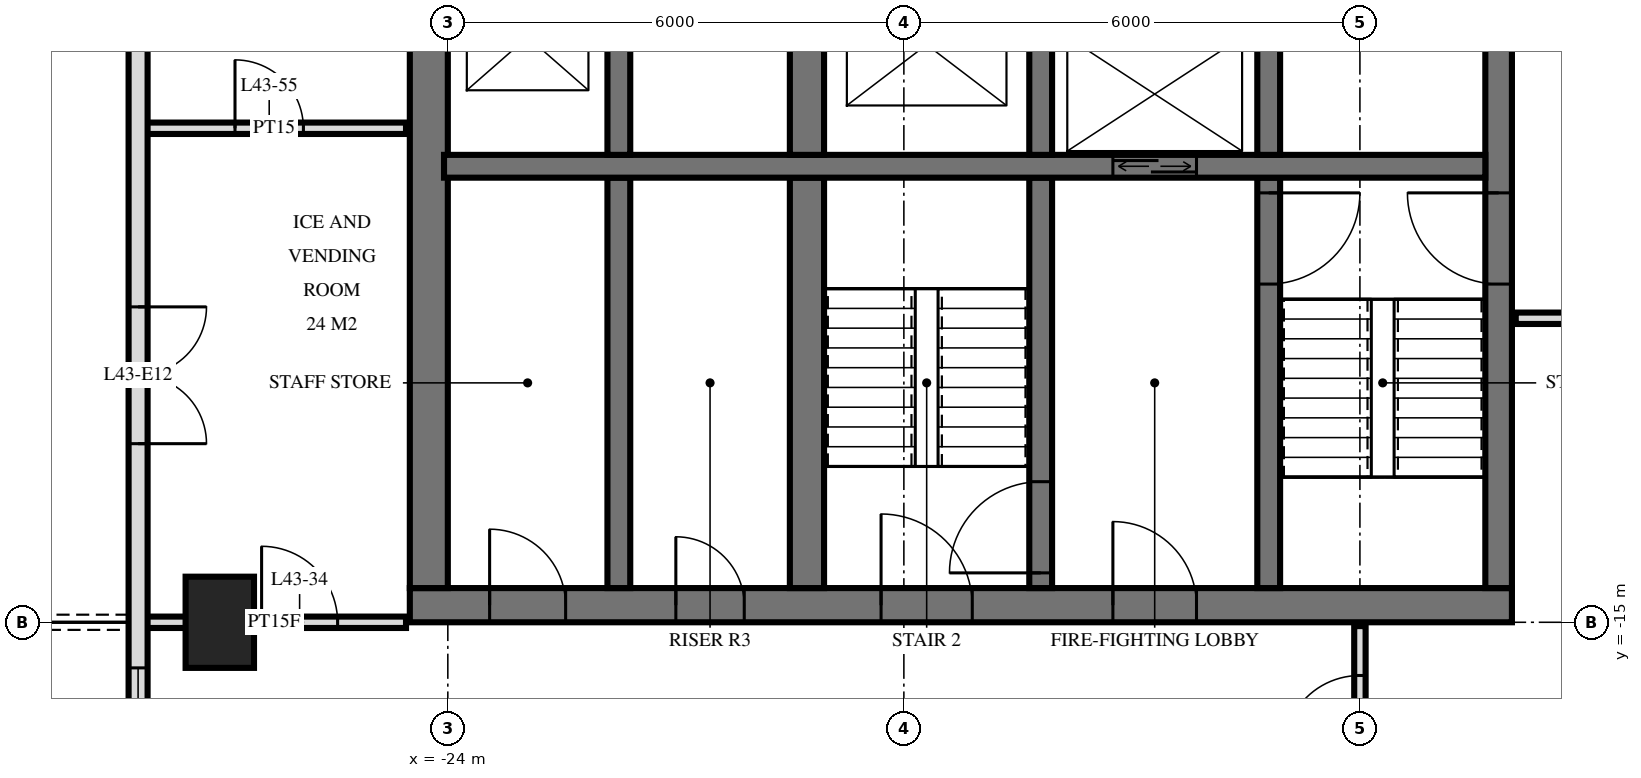
"""IFC4 building model, lengths in metres.
Left out: names, types, materials, properties, quantities, classifications, styles, units other than length and angle.
Written with IfcOpenShell. Run it as: python <this file> out.ifc"""

import sys

from ifc_helpers import new_model, si_unit, direction, frame, frame_2d, origin, origin_2d, place, context, subcontext, project, spatial, rectangle, extrude, element, fill, save


model = new_model("IFC4")
c1 = context("Model", 3, precision=1e-05, world=origin(), true_north=direction((0.0, 1.0)))
c2 = subcontext(c1, "Body", "Model", "MODEL_VIEW")
j1 = project(units=[si_unit("LENGTHUNIT", "METRE"), si_unit("PLANEANGLEUNIT", "RADIAN")], contexts=[c1])
p1 = place(None, origin())
s1 = spatial("IfcSite", under=j1, at=p1, CompositionType="ELEMENT")
p2 = place(p1, origin())
s2 = spatial("IfcBuilding", under=s1, at=p2, CompositionType="ELEMENT")
p3 = place(p2, frame((0.0, 0.0, 166.8)))
s3 = spatial("IfcBuildingStorey", under=s2, at=p3, CompositionType="ELEMENT", Elevation=166.8)
p4 = place(p3, frame((-27.0, -15.0, 0.0), z_axis=(0.0, 0.0, 1.0), x_axis=(0.0, 1.0, 0.0)))
e1 = element("IfcColumn", 1, at=p4, inside=s3, PredefinedType="COLUMN", context=c2, shape_type="SweptSolid", body=[
    extrude(rectangle(XDim=1.2, YDim=0.9, at=origin_2d()), origin(), (0.0, 0.0, 1.0), 3.6),
])
p5 = place(p3, frame((-24.5, -14.775, 0.0), z_axis=(0.0, 0.0, 1.0), x_axis=(1.0, 0.0, 0.0)))
e2 = element("IfcWall", 2, at=p5, inside=s3, PredefinedType="SHEAR", context=c2, shape_type="SweptSolid", body=[
    extrude(rectangle(XDim=14.5, YDim=0.45, at=frame_2d((7.25, 0.0))), origin(), (0.0, 0.0, 1.0), 3.6),
])
p6 = place(p5, frame((6.2, 0.0, 0.0)))
e3 = element("IfcOpeningElement", 3, at=p6, cuts=e2, PredefinedType="OPENING", context=c2, shape_type="SweptSolid", body=[
    extrude(rectangle(XDim=1.2, YDim=2.1, at=frame_2d((0.6, 1.05))), frame((0.0, 0.235, 0.0), z_axis=(0.0, -1.0, 0.0), x_axis=(1.0, 0.0, 0.0)), (0.0, 0.0, 1.0), 0.47),
])
p7 = place(p5, frame((9.25, 0.0, 0.0)))
e4 = element("IfcOpeningElement", 4, at=p7, cuts=e2, PredefinedType="OPENING", context=c2, shape_type="SweptSolid", body=[
    extrude(rectangle(XDim=1.1, YDim=2.1, at=frame_2d((0.55, 1.05))), frame((0.0, 0.235, 0.0), z_axis=(0.0, -1.0, 0.0), x_axis=(1.0, 0.0, 0.0)), (0.0, 0.0, 1.0), 0.47),
])
p8 = place(p5, frame((3.5, 0.0, 0.0)))
e5 = element("IfcOpeningElement", 5, at=p8, cuts=e2, PredefinedType="OPENING", context=c2, shape_type="SweptSolid", body=[
    extrude(rectangle(XDim=0.9, YDim=2.1, at=frame_2d((0.45, 1.05))), frame((0.0, 0.235, 0.0), z_axis=(0.0, -1.0, 0.0), x_axis=(1.0, 0.0, 0.0)), (0.0, 0.0, 1.0), 0.47),
])
p9 = place(p5, frame((1.05, 0.0, 0.0)))
e6 = element("IfcOpeningElement", 6, at=p9, cuts=e2, PredefinedType="OPENING", context=c2, shape_type="SweptSolid", body=[
    extrude(rectangle(XDim=1.0, YDim=2.1, at=frame_2d((0.5, 1.05))), frame((0.0, 0.235, 0.0), z_axis=(0.0, -1.0, 0.0), x_axis=(1.0, 0.0, 0.0)), (0.0, 0.0, 1.0), 0.47),
])
p10 = place(p3, frame((-10.175, -14.55, 0.0), z_axis=(0.0, 0.0, 1.0), x_axis=(0.0, 1.0, 0.0)))
e7 = element("IfcWall", 7, at=p10, inside=s3, PredefinedType="SHEAR", context=c2, shape_type="SweptSolid", body=[
    extrude(rectangle(XDim=14.1, YDim=0.35, at=frame_2d((7.05, 0.0))), origin(), (0.0, 0.0, 1.0), 3.6),
])
p11 = place(p10, frame((8.4, 0.0, 0.0)))
e8 = element("IfcOpeningElement", 8, at=p11, cuts=e7, PredefinedType="OPENING", context=c2, shape_type="SweptSolid", body=[
    extrude(rectangle(XDim=1.4, YDim=2.4, at=frame_2d((0.7, 1.2))), frame((0.0, 0.185, 0.0), z_axis=(0.0, -1.0, 0.0), x_axis=(1.0, 0.0, 0.0)), (0.0, 0.0, 1.0), 0.37),
])
p12 = place(p10, frame((10.0, 0.0, 0.0)))
e9 = element("IfcOpeningElement", 9, at=p12, cuts=e7, PredefinedType="OPENING", context=c2, shape_type="SweptSolid", body=[
    extrude(rectangle(XDim=1.4, YDim=2.4, at=frame_2d((0.7, 1.2))), frame((0.0, 0.185, 0.0), z_axis=(0.0, -1.0, 0.0), x_axis=(1.0, 0.0, 0.0)), (0.0, 0.0, 1.0), 0.37),
])
p13 = place(p10, frame((4.0, 0.0, 0.0)))
e10 = element("IfcOpeningElement", 10, at=p13, cuts=e7, PredefinedType="OPENING", context=c2, shape_type="SweptSolid", body=[
    extrude(rectangle(XDim=1.2, YDim=2.1, at=frame_2d((0.6, 1.05))), frame((0.0, 0.185, 0.0), z_axis=(0.0, -1.0, 0.0), x_axis=(1.0, 0.0, 0.0)), (0.0, 0.0, 1.0), 0.37),
])
p14 = place(p3, frame((-24.25, -14.55, 0.0), z_axis=(0.0, 0.0, 1.0), x_axis=(0.0, 1.0, 0.0)))
e11 = element("IfcWall", 11, at=p14, inside=s3, PredefinedType="SHEAR", context=c2, shape_type="SweptSolid", body=[
    extrude(rectangle(XDim=14.1, YDim=0.5, at=frame_2d((7.05, 0.0))), origin(), (0.0, 0.0, 1.0), 3.6),
])
p15 = place(p3, frame((-24.05, -9.0, 0.0), z_axis=(0.0, 0.0, 1.0), x_axis=(1.0, 0.0, 0.0)))
e12 = element("IfcWall", 12, at=p15, inside=s3, PredefinedType="SHEAR", context=c2, shape_type="SweptSolid", body=[
    extrude(rectangle(XDim=13.7, YDim=0.3, at=frame_2d((6.85, 0.0))), origin(), (0.0, 0.0, 1.0), 3.6),
])
p16 = place(p15, frame((8.8, 0.0, 0.0)))
e13 = element("IfcOpeningElement", 13, at=p16, cuts=e12, PredefinedType="OPENING", context=c2, shape_type="SweptSolid", body=[
    extrude(rectangle(XDim=1.1, YDim=2.1, at=frame_2d((0.55, 1.05))), frame((0.0, 0.16, 0.0), z_axis=(0.0, -1.0, 0.0), x_axis=(1.0, 0.0, 0.0)), (0.0, 0.0, 1.0), 0.32),
])
p17 = place(p3, frame((-13.2, -8.85, 0.0), z_axis=(0.0, 0.0, 1.0), x_axis=(0.0, 1.0, 0.0)))
e14 = element("IfcWall", 14, at=p17, inside=s3, PredefinedType="SHEAR", context=c2, shape_type="SweptSolid", body=[
    extrude(rectangle(XDim=2.3, YDim=0.3, at=frame_2d((1.15, 0.0))), origin(), (0.0, 0.0, 1.0), 3.6),
])
p18 = place(p3, frame((-13.2, -14.55, 0.0), z_axis=(0.0, 0.0, 1.0), x_axis=(0.0, 1.0, 0.0)))
e15 = element("IfcWall", 15, at=p18, inside=s3, PredefinedType="SHEAR", context=c2, shape_type="SweptSolid", body=[
    extrude(rectangle(XDim=5.4, YDim=0.3, at=frame_2d((2.7, 0.0))), origin(), (0.0, 0.0, 1.0), 3.6),
])
p19 = place(p18, frame((4.0, 0.0, 0.0)))
e16 = element("IfcOpeningElement", 16, at=p19, cuts=e15, PredefinedType="OPENING", context=c2, shape_type="SweptSolid", body=[
    extrude(rectangle(XDim=1.2, YDim=2.1, at=frame_2d((0.6, 1.05))), frame((0.0, 0.16, 0.0), z_axis=(0.0, -1.0, 0.0), x_axis=(1.0, 0.0, 0.0)), (0.0, 0.0, 1.0), 0.32),
])
p20 = place(p3, frame((-16.2, -8.85, 0.0), z_axis=(0.0, 0.0, 1.0), x_axis=(0.0, 1.0, 0.0)))
e17 = element("IfcWall", 17, at=p20, inside=s3, PredefinedType="SHEAR", context=c2, shape_type="SweptSolid", body=[
    extrude(rectangle(XDim=2.3, YDim=0.3, at=frame_2d((1.15, 0.0))), origin(), (0.0, 0.0, 1.0), 3.6),
])
p21 = place(p3, frame((-16.2, -14.55, 0.0), z_axis=(0.0, 0.0, 1.0), x_axis=(0.0, 1.0, 0.0)))
e18 = element("IfcWall", 18, at=p21, inside=s3, PredefinedType="SHEAR", context=c2, shape_type="SweptSolid", body=[
    extrude(rectangle(XDim=5.4, YDim=0.3, at=frame_2d((2.7, 0.0))), origin(), (0.0, 0.0, 1.0), 3.6),
])
p22 = place(p21, frame((0.2, 0.0, 0.0)))
e19 = element("IfcOpeningElement", 19, at=p22, cuts=e18, PredefinedType="OPENING", context=c2, shape_type="SweptSolid", body=[
    extrude(rectangle(XDim=1.2, YDim=2.1, at=frame_2d((0.6, 1.05))), frame((0.0, 0.16, 0.0), z_axis=(0.0, -1.0, 0.0), x_axis=(1.0, 0.0, 0.0)), (0.0, 0.0, 1.0), 0.32),
])
p23 = place(p3, frame((-19.275, -8.85, 0.0), z_axis=(0.0, 0.0, 1.0), x_axis=(0.0, 1.0, 0.0)))
e20 = element("IfcWall", 20, at=p23, inside=s3, PredefinedType="SHEAR", context=c2, shape_type="SweptSolid", body=[
    extrude(rectangle(XDim=2.3, YDim=0.45, at=frame_2d((1.15, 0.0))), origin(), (0.0, 0.0, 1.0), 3.6),
])
p24 = place(p3, frame((-19.275, -14.55, 0.0), z_axis=(0.0, 0.0, 1.0), x_axis=(0.0, 1.0, 0.0)))
e21 = element("IfcWall", 21, at=p24, inside=s3, PredefinedType="SHEAR", context=c2, shape_type="SweptSolid", body=[
    extrude(rectangle(XDim=5.4, YDim=0.45, at=frame_2d((2.7, 0.0))), origin(), (0.0, 0.0, 1.0), 3.6),
])
p25 = place(p3, frame((-21.75, -8.85, 0.0), z_axis=(0.0, 0.0, 1.0), x_axis=(0.0, 1.0, 0.0)))
e22 = element("IfcWall", 22, at=p25, inside=s3, PredefinedType="SHEAR", context=c2, shape_type="SweptSolid", body=[
    extrude(rectangle(XDim=2.3, YDim=0.3, at=frame_2d((1.15, 0.0))), origin(), (0.0, 0.0, 1.0), 3.6),
])
p26 = place(p3, frame((-21.75, -14.55, 0.0), z_axis=(0.0, 0.0, 1.0), x_axis=(0.0, 1.0, 0.0)))
e23 = element("IfcWall", 23, at=p26, inside=s3, PredefinedType="SHEAR", context=c2, shape_type="SweptSolid", body=[
    extrude(rectangle(XDim=5.4, YDim=0.3, at=frame_2d((2.7, 0.0))), origin(), (0.0, 0.0, 1.0), 3.6),
])
p27 = place(p3, frame((-28.075, -3.325, 0.0), z_axis=(0.0, 0.0, 1.0), x_axis=(0.0, -1.0, 0.0)))
e24 = element("IfcWall", 24, at=p27, inside=s3, PredefinedType="SOLIDWALL", context=c2, shape_type="SweptSolid", body=[
    extrude(rectangle(XDim=25.951, YDim=0.25, at=frame_2d((12.975, 0.0))), origin(), (0.0, 0.0, 1.0), 3.32),
])
p28 = place(p27, frame((7.525, 0.0, 0.0)))
e25 = element("IfcOpeningElement", 25, at=p28, cuts=e24, PredefinedType="OPENING", context=c2, shape_type="SweptSolid", body=[
    extrude(rectangle(XDim=1.8, YDim=2.4, at=frame_2d((0.9, 1.2))), frame((0.0, 0.135, 0.0), z_axis=(0.0, -1.0, 0.0), x_axis=(1.0, 0.0, 0.0)), (0.0, 0.0, 1.0), 0.27),
])
p29 = place(p27, frame((12.275, 0.0, 0.3)))
e26 = element("IfcOpeningElement", 26, at=p29, cuts=e24, PredefinedType="OPENING", context=c2, shape_type="SweptSolid", body=[
    extrude(rectangle(XDim=1.2, YDim=2.1, at=frame_2d((0.6, 1.05))), frame((0.0, 0.135, 0.0), z_axis=(0.0, -1.0, 0.0), x_axis=(1.0, 0.0, 0.0)), (0.0, 0.0, 1.0), 0.27),
])
p30 = place(p27, frame((14.975, 0.0, 0.3)))
e27 = element("IfcOpeningElement", 27, at=p30, cuts=e24, PredefinedType="OPENING", context=c2, shape_type="SweptSolid", body=[
    extrude(rectangle(XDim=2.4, YDim=2.1, at=frame_2d((1.2, 1.05))), frame((0.0, 0.135, 0.0), z_axis=(0.0, -1.0, 0.0), x_axis=(1.0, 0.0, 0.0)), (0.0, 0.0, 1.0), 0.27),
])
p31 = place(p27, frame((18.175, 0.0, 0.0)))
e28 = element("IfcOpeningElement", 28, at=p31, cuts=e24, PredefinedType="OPENING", context=c2, shape_type="SweptSolid", body=[
    extrude(rectangle(XDim=1.8, YDim=2.4, at=frame_2d((0.9, 1.2))), frame((0.0, 0.135, 0.0), z_axis=(0.0, -1.0, 0.0), x_axis=(1.0, 0.0, 0.0)), (0.0, 0.0, 1.0), 0.27),
])
p32 = place(p27, frame((21.075, 0.0, 0.0)))
e29 = element("IfcOpeningElement", 29, at=p32, cuts=e24, PredefinedType="OPENING", context=c2, shape_type="SweptSolid", body=[
    extrude(rectangle(XDim=1.8, YDim=2.4, at=frame_2d((0.9, 1.2))), frame((0.0, 0.135, 0.0), z_axis=(0.0, -1.0, 0.0), x_axis=(1.0, 0.0, 0.0)), (0.0, 0.0, 1.0), 0.27),
])
p33 = place(p27, frame((23.825, 0.0, 0.3)))
e30 = element("IfcOpeningElement", 30, at=p33, cuts=e24, PredefinedType="OPENING", context=c2, shape_type="SweptSolid", body=[
    extrude(rectangle(XDim=1.8, YDim=2.1, at=frame_2d((0.9, 1.05))), frame((0.0, 0.135, 0.0), z_axis=(0.0, -1.0, 0.0), x_axis=(1.0, 0.0, 0.0)), (0.0, 0.0, 1.0), 0.27),
])
p34 = place(p3, frame((-12.0, -17.4, 0.0), z_axis=(0.0, 0.0, 1.0), x_axis=(0.0, 1.0, 0.0)))
e31 = element("IfcWall", 31, at=p34, inside=s3, PredefinedType="PARTITIONING", context=c2, shape_type="SweptSolid", body=[
    extrude(rectangle(XDim=2.35, YDim=0.15, at=frame_2d((1.175, 0.0))), origin(), (0.0, 0.0, 1.0), 3.32),
])
p35 = place(p34, frame((0.7, 0.0, 0.0)))
e32 = element("IfcOpeningElement", 32, at=p35, cuts=e31, PredefinedType="OPENING", context=c2, shape_type="SweptSolid", body=[
    extrude(rectangle(XDim=1.0, YDim=2.1, at=frame_2d((0.5, 1.05))), frame((0.0, 0.085, 0.0), z_axis=(0.0, -1.0, 0.0), x_axis=(1.0, 0.0, 0.0)), (0.0, 0.0, 1.0), 0.17),
])
p36 = place(p3, frame((-28.02, -15.0, 0.0), z_axis=(0.0, 0.0, 1.0), x_axis=(1.0, 0.0, 0.0)))
e33 = element("IfcWall", 33, at=p36, inside=s3, PredefinedType="PARTITIONING", context=c2, shape_type="SweptSolid", body=[
    extrude(rectangle(XDim=3.47, YDim=0.15, at=frame_2d((1.735, 0.0))), origin(), (0.0, 0.0, 1.0), 3.32),
])
p37 = place(p36, frame((1.57, 0.0, 0.0)))
e34 = element("IfcOpeningElement", 34, at=p37, cuts=e33, PredefinedType="OPENING", context=c2, shape_type="SweptSolid", body=[
    extrude(rectangle(XDim=1.0, YDim=2.1, at=frame_2d((0.5, 1.05))), frame((0.0, 0.085, 0.0), z_axis=(0.0, -1.0, 0.0), x_axis=(1.0, 0.0, 0.0)), (0.0, 0.0, 1.0), 0.17),
])
p38 = place(p3, frame((-9.95, -11.0, 0.0), z_axis=(0.0, 0.0, 1.0), x_axis=(1.0, 0.0, 0.0)))
e35 = element("IfcWall", 35, at=p38, inside=s3, PredefinedType="PARTITIONING", context=c2, shape_type="SweptSolid", body=[
    extrude(rectangle(XDim=19.9, YDim=0.15, at=frame_2d((9.95, 0.0))), origin(), (0.0, 0.0, 1.0), 3.32),
])
p39 = place(p38, frame((9.45, 0.0, 0.0)))
e36 = element("IfcOpeningElement", 36, at=p39, cuts=e35, PredefinedType="OPENING", context=c2, shape_type="SweptSolid", body=[
    extrude(rectangle(XDim=1.0, YDim=2.1, at=frame_2d((0.5, 1.05))), frame((0.0, 0.085, 0.0), z_axis=(0.0, -1.0, 0.0), x_axis=(1.0, 0.0, 0.0)), (0.0, 0.0, 1.0), 0.17),
])
p40 = place(p38, frame((3.45, 0.0, 0.0)))
e37 = element("IfcOpeningElement", 37, at=p40, cuts=e35, PredefinedType="OPENING", context=c2, shape_type="SweptSolid", body=[
    extrude(rectangle(XDim=1.0, YDim=2.1, at=frame_2d((0.5, 1.05))), frame((0.0, 0.085, 0.0), z_axis=(0.0, -1.0, 0.0), x_axis=(1.0, 0.0, 0.0)), (0.0, 0.0, 1.0), 0.17),
])
p41 = place(p3, frame((-28.02, -8.5, 0.0), z_axis=(0.0, 0.0, 1.0), x_axis=(1.0, 0.0, 0.0)))
e38 = element("IfcWall", 38, at=p41, inside=s3, PredefinedType="PARTITIONING", context=c2, shape_type="SweptSolid", body=[
    extrude(rectangle(XDim=3.47, YDim=0.15, at=frame_2d((1.735, 0.0))), origin(), (0.0, 0.0, 1.0), 3.32),
])
p42 = place(p41, frame((1.22, 0.0, 0.0)))
e39 = element("IfcOpeningElement", 39, at=p42, cuts=e38, PredefinedType="OPENING", context=c2, shape_type="SweptSolid", body=[
    extrude(rectangle(XDim=0.9, YDim=2.1, at=frame_2d((0.45, 1.05))), frame((0.0, 0.085, 0.0), z_axis=(0.0, -1.0, 0.0), x_axis=(1.0, 0.0, 0.0)), (0.0, 0.0, 1.0), 0.17),
])
p43 = place(p28, origin())
e40 = element("IfcDoor", 40, at=p43, inside=s3, OperationType="DOUBLE_DOOR_SINGLE_SWING", PredefinedType="DOOR", context=c2, shape_type="SweptSolid", body=[
    extrude(rectangle(XDim=1.8, YDim=2.4, at=frame_2d((0.9, 1.2))), frame((0.0, 0.025, 0.0), z_axis=(0.0, -1.0, 0.0), x_axis=(1.0, 0.0, 0.0)), (0.0, 0.0, 1.0), 0.05),
])
fill(e25, e40)
p44 = place(p29, origin())
e41 = element("IfcWindow", 41, at=p44, inside=s3, PartitioningType="SINGLE_PANEL", PredefinedType="WINDOW", context=c2, shape_type="SweptSolid", body=[
    extrude(rectangle(XDim=1.2, YDim=2.1, at=frame_2d((0.6, 1.05))), frame((0.0, 0.03, 0.0), z_axis=(0.0, -1.0, 0.0), x_axis=(1.0, 0.0, 0.0)), (0.0, 0.0, 1.0), 0.06),
])
fill(e26, e41)
p45 = place(p16, origin())
e42 = element("IfcDoor", 42, at=p45, inside=s3, OperationType="DOUBLE_DOOR_SLIDING", PredefinedType="USERDEFINED", context=c2, shape_type="SweptSolid", body=[
    extrude(rectangle(XDim=1.1, YDim=2.1, at=frame_2d((0.55, 1.05))), frame((0.0, 0.025, 0.0), z_axis=(0.0, -1.0, 0.0), x_axis=(1.0, 0.0, 0.0)), (0.0, 0.0, 1.0), 0.05),
])
fill(e13, e42)
p46 = place(p13, origin())
e43 = element("IfcDoor", 43, at=p46, inside=s3, OperationType="SINGLE_SWING_LEFT", PredefinedType="DOOR", context=c2, shape_type="SweptSolid", body=[
    extrude(rectangle(XDim=1.2, YDim=2.1, at=frame_2d((0.6, 1.05))), frame((0.0, 0.025, 0.0), z_axis=(0.0, -1.0, 0.0), x_axis=(1.0, 0.0, 0.0)), (0.0, 0.0, 1.0), 0.05),
])
fill(e10, e43)
p47 = place(p6, origin())
e44 = element("IfcDoor", 44, at=p47, inside=s3, OperationType="SINGLE_SWING_RIGHT", PredefinedType="DOOR", context=c2, shape_type="SweptSolid", body=[
    extrude(rectangle(XDim=1.2, YDim=2.1, at=frame_2d((0.6, 1.05))), frame((0.0, 0.025, 0.0), z_axis=(0.0, -1.0, 0.0), x_axis=(1.0, 0.0, 0.0)), (0.0, 0.0, 1.0), 0.05),
])
fill(e3, e44)
p48 = place(p7, origin())
e45 = element("IfcDoor", 45, at=p48, inside=s3, OperationType="SINGLE_SWING_RIGHT", PredefinedType="DOOR", context=c2, shape_type="SweptSolid", body=[
    extrude(rectangle(XDim=1.1, YDim=2.1, at=frame_2d((0.55, 1.05))), frame((0.0, 0.025, 0.0), z_axis=(0.0, -1.0, 0.0), x_axis=(1.0, 0.0, 0.0)), (0.0, 0.0, 1.0), 0.05),
])
fill(e4, e45)
p49 = place(p8, origin())
e46 = element("IfcDoor", 46, at=p49, inside=s3, OperationType="SINGLE_SWING_RIGHT", PredefinedType="DOOR", context=c2, shape_type="SweptSolid", body=[
    extrude(rectangle(XDim=0.9, YDim=2.1, at=frame_2d((0.45, 1.05))), frame((0.0, 0.025, 0.0), z_axis=(0.0, -1.0, 0.0), x_axis=(1.0, 0.0, 0.0)), (0.0, 0.0, 1.0), 0.05),
])
fill(e5, e46)
p50 = place(p9, origin())
e47 = element("IfcDoor", 47, at=p50, inside=s3, OperationType="SINGLE_SWING_RIGHT", PredefinedType="DOOR", context=c2, shape_type="SweptSolid", body=[
    extrude(rectangle(XDim=1.0, YDim=2.1, at=frame_2d((0.5, 1.05))), frame((0.0, 0.025, 0.0), z_axis=(0.0, -1.0, 0.0), x_axis=(1.0, 0.0, 0.0)), (0.0, 0.0, 1.0), 0.05),
])
fill(e6, e47)
p51 = place(p19, frame((0.6, 0.0, 0.0), z_axis=(0.0, 0.0, 1.0), x_axis=(-1.0, 0.0, 0.0)))
e48 = element("IfcDoor", 48, at=p51, inside=s3, OperationType="SINGLE_SWING_RIGHT", PredefinedType="DOOR", context=c2, shape_type="SweptSolid", body=[
    extrude(rectangle(XDim=1.2, YDim=2.1, at=frame_2d((0.0, 1.05))), frame((0.0, -0.025, 0.0), z_axis=(0.0, 1.0, 0.0), x_axis=(-1.0, 0.0, 0.0)), (0.0, 0.0, 1.0), 0.05),
])
fill(e16, e48)
p52 = place(p22, origin())
e49 = element("IfcDoor", 49, at=p52, inside=s3, OperationType="SINGLE_SWING_RIGHT", PredefinedType="DOOR", context=c2, shape_type="SweptSolid", body=[
    extrude(rectangle(XDim=1.2, YDim=2.1, at=frame_2d((0.6, 1.05))), frame((0.0, 0.025, 0.0), z_axis=(0.0, -1.0, 0.0), x_axis=(1.0, 0.0, 0.0)), (0.0, 0.0, 1.0), 0.05),
])
fill(e19, e49)
p53 = place(p35, origin())
e50 = element("IfcDoor", 50, at=p53, inside=s3, OperationType="SINGLE_SWING_RIGHT", PredefinedType="DOOR", context=c2, shape_type="SweptSolid", body=[
    extrude(rectangle(XDim=1.0, YDim=2.1, at=frame_2d((0.5, 1.05))), frame((0.0, 0.025, 0.0), z_axis=(0.0, -1.0, 0.0), x_axis=(1.0, 0.0, 0.0)), (0.0, 0.0, 1.0), 0.05),
])
fill(e32, e50)
p54 = place(p37, origin())
e51 = element("IfcDoor", 51, at=p54, inside=s3, OperationType="SINGLE_SWING_RIGHT", PredefinedType="DOOR", context=c2, shape_type="SweptSolid", body=[
    extrude(rectangle(XDim=1.0, YDim=2.1, at=frame_2d((0.5, 1.05))), frame((0.0, 0.025, 0.0), z_axis=(0.0, -1.0, 0.0), x_axis=(1.0, 0.0, 0.0)), (0.0, 0.0, 1.0), 0.05),
])
fill(e34, e51)
p55 = place(p42, origin())
e52 = element("IfcDoor", 52, at=p55, inside=s3, OperationType="SINGLE_SWING_RIGHT", PredefinedType="DOOR", context=c2, shape_type="SweptSolid", body=[
    extrude(rectangle(XDim=0.9, YDim=2.1, at=frame_2d((0.45, 1.05))), frame((0.0, 0.025, 0.0), z_axis=(0.0, -1.0, 0.0), x_axis=(1.0, 0.0, 0.0)), (0.0, 0.0, 1.0), 0.05),
])
fill(e39, e52)
save(model, sys.argv[1])
